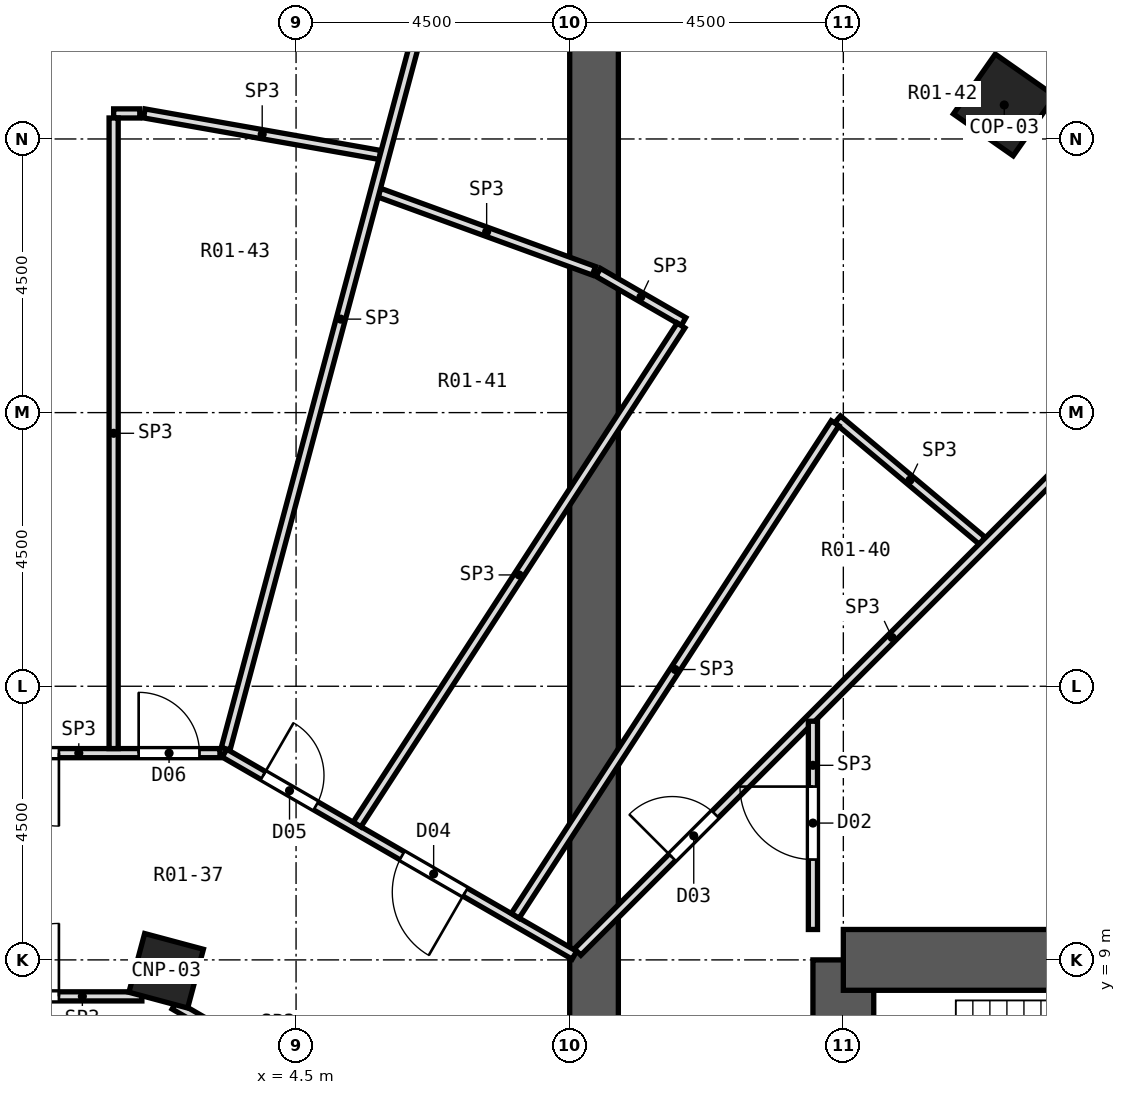
"""IFC4 building model, lengths in metres.
Left out: names, types, materials, properties, quantities, classifications, styles, units other than length and angle.
Written with IfcOpenShell. Run it as: python <this file> out.ifc"""

import sys

from ifc_helpers import new_model, si_unit, direction, frame, frame_2d, origin, origin_2d, place, context, subcontext, project, spatial, rectangle, extrude, element, fill, save


model = new_model("IFC4")
c1 = context("Model", 3, precision=1e-05, world=origin(), true_north=direction((0.0, 1.0)))
c2 = subcontext(c1, "Body", "Model", "MODEL_VIEW")
j1 = project(units=[si_unit("LENGTHUNIT", "METRE"), si_unit("PLANEANGLEUNIT", "RADIAN")], contexts=[c1])
p1 = place(None, origin())
s1 = spatial("IfcSite", under=j1, at=p1, CompositionType="ELEMENT")
p2 = place(p1, origin())
s2 = spatial("IfcBuilding", under=s1, at=p2, CompositionType="ELEMENT")
p3 = place(p2, frame((0.0, 0.0, -9.0)))
s3 = spatial("IfcBuildingStorey", under=s2, at=p3, CompositionType="ELEMENT", Elevation=-9.0)
p4 = place(p3, frame((16.146, 23.059, -0.3), z_axis=(0.0, 0.0, 1.0), x_axis=(0.573576436351, 0.819152044289, 0.0)))
e1 = element("IfcColumn", 1, at=p4, inside=s3, PredefinedType="COLUMN", context=c2, shape_type="SweptSolid", body=[
    extrude(rectangle(XDim=1.2, YDim=1.2, at=origin_2d()), origin(), (0.0, 0.0, 1.0), 4.8),
])
p5 = place(p3, frame((2.364, 8.821, -0.3), z_axis=(0.0, 0.0, 1.0), x_axis=(0.258819045103, 0.965925826289, 0.0)))
e2 = element("IfcColumn", 2, at=p5, inside=s3, PredefinedType="COLUMN", context=c2, shape_type="SweptSolid", body=[
    extrude(rectangle(XDim=1.0, YDim=1.0, at=origin_2d()), origin(), (0.0, 0.0, 1.0), 4.8),
])
p6 = place(p3, frame((13.5, -9.0, -0.3), z_axis=(0.0, 0.0, 1.0), x_axis=(0.0, 1.0, 0.0)))
e3 = element("IfcWall", 3, at=p6, inside=s3, PredefinedType="SHEAR", context=c2, shape_type="SweptSolid", body=[
    extrude(rectangle(XDim=18.0, YDim=1.0, at=frame_2d((9.0, 0.0))), origin(), (0.0, 0.0, 1.0), 4.8),
])
p7 = place(p6, frame((15.4, 0.0, 0.3)))
e4 = element("IfcOpeningElement", 4, at=p7, cuts=e3, PredefinedType="OPENING", context=c2, shape_type="SweptSolid", body=[
    extrude(rectangle(XDim=1.2, YDim=2.1, at=frame_2d((0.6, 1.05))), frame((0.0, 0.512, 0.0), z_axis=(0.0, -1.0, 0.0), x_axis=(1.0, 0.0, 0.0)), (0.0, 0.0, 1.0), 1.024),
])
p8 = place(p6, frame((1.4, 0.0, 0.3)))
e5 = element("IfcOpeningElement", 5, at=p8, cuts=e3, PredefinedType="OPENING", context=c2, shape_type="SweptSolid", body=[
    extrude(rectangle(XDim=1.2, YDim=2.1, at=frame_2d((0.6, 1.05))), frame((0.0, 0.512, 0.0), z_axis=(0.0, -1.0, 0.0), x_axis=(1.0, 0.0, 0.0)), (0.0, 0.0, 1.0), 1.024),
])
p9 = place(p6, frame((7.5, 0.0, 0.3)))
e6 = element("IfcOpeningElement", 6, at=p9, cuts=e3, PredefinedType="OPENING", context=c2, shape_type="SweptSolid", body=[
    extrude(rectangle(XDim=3.0, YDim=2.4, at=frame_2d((1.5, 1.2))), frame((0.0, 0.512, 0.0), z_axis=(0.0, -1.0, 0.0), x_axis=(1.0, 0.0, 0.0)), (0.0, 0.0, 1.0), 1.024),
])
p10 = place(p3, frame((13.5, 9.0, -0.3), z_axis=(0.0, 0.0, 1.0), x_axis=(1.0, 0.0, 0.0)))
e7 = element("IfcWall", 7, at=p10, inside=s3, PredefinedType="SHEAR", context=c2, shape_type="SweptSolid", body=[
    extrude(rectangle(XDim=12.4, YDim=1.0, at=frame_2d((6.2, 0.0))), origin(), (0.0, 0.0, 1.0), 4.8),
])
p11 = place(p3, frame((9.4, -27.077, -0.3), z_axis=(0.0, 0.0, 1.0), x_axis=(0.0, 1.0, 0.0)))
e8 = element("IfcWall", 8, at=p11, inside=s3, PredefinedType="SHEAR", context=c2, shape_type="SweptSolid", body=[
    extrude(rectangle(XDim=54.154, YDim=0.8, at=frame_2d((27.077, 0.0))), origin(), (0.0, 0.0, 1.0), 4.8),
])
p12 = place(p3, frame((13.405, 17.888, 0.0), z_axis=(0.0, 0.0, 1.0), x_axis=(0.766130386508, -0.642685172436, 0.0)))
e9 = element("IfcWall", 9, at=p12, inside=s3, PredefinedType="PARTITIONING", context=c2, shape_type="SweptSolid", body=[
    extrude(rectangle(XDim=3.107, YDim=0.15, at=frame_2d((1.553, 0.0))), origin(), (0.0, 0.0, 1.0), 3.95),
])
p13 = place(p3, frame((2.499, 8.257, 0.0), z_axis=(0.0, 0.0, 1.0), x_axis=(0.865990036525, -0.500061252887, 0.0)))
e10 = element("IfcWall", 10, at=p13, inside=s3, PredefinedType="PARTITIONING", context=c2, shape_type="SweptSolid", body=[
    extrude(rectangle(XDim=3.93, YDim=0.15, at=frame_2d((1.965, 0.0))), origin(), (0.0, 0.0, 1.0), 3.95),
])
p14 = place(p3, frame((3.323, 12.4, 0.0), z_axis=(0.0, 0.0, 1.0), x_axis=(0.865961614908, -0.500110469302, 0.0)))
e11 = element("IfcWall", 11, at=p14, inside=s3, PredefinedType="PARTITIONING", context=c2, shape_type="SweptSolid", body=[
    extrude(rectangle(XDim=6.645, YDim=0.15, at=frame_2d((3.322, 0.0))), origin(), (0.0, 0.0, 1.0), 3.95),
])
p15 = place(p14, frame((3.372, 0.0, 0.0)))
e12 = element("IfcOpeningElement", 12, at=p15, cuts=e11, PredefinedType="OPENING", context=c2, shape_type="SweptSolid", body=[
    extrude(rectangle(XDim=1.2, YDim=2.1, at=frame_2d((0.6, 1.05))), frame((0.0, 0.087, 0.0), z_axis=(0.0, -1.0, 0.0), x_axis=(1.0, 0.0, 0.0)), (0.0, 0.0, 1.0), 0.174),
])
p16 = place(p14, frame((0.735, 0.0, 0.0)))
e13 = element("IfcOpeningElement", 13, at=p16, cuts=e11, PredefinedType="OPENING", context=c2, shape_type="SweptSolid", body=[
    extrude(rectangle(XDim=1.0, YDim=2.1, at=frame_2d((0.5, 1.05))), frame((0.0, 0.087, 0.0), z_axis=(0.0, -1.0, 0.0), x_axis=(1.0, 0.0, 0.0)), (0.0, 0.0, 1.0), 0.174),
])
p17 = place(p3, frame((9.469, 20.306, 0.0), z_axis=(0.0, 0.0, 1.0), x_axis=(0.866092740453, -0.499883351328, 0.0)))
e14 = element("IfcWall", 14, at=p17, inside=s3, PredefinedType="PARTITIONING", context=c2, shape_type="SweptSolid", body=[
    extrude(rectangle(XDim=1.62, YDim=0.15, at=frame_2d((0.81, 0.0))), origin(), (0.0, 0.0, 1.0), 3.95),
])
p18 = place(p3, frame((5.869, 21.616, 0.0), z_axis=(0.0, 0.0, 1.0), x_axis=(0.939696584941, -0.342009251703, 0.0)))
e15 = element("IfcWall", 15, at=p18, inside=s3, PredefinedType="PARTITIONING", context=c2, shape_type="SweptSolid", body=[
    extrude(rectangle(XDim=3.756, YDim=0.15, at=frame_2d((1.878, 0.0))), origin(), (0.0, 0.0, 1.0), 3.95),
])
p19 = place(p3, frame((2.005, 22.92, 0.0), z_axis=(0.0, 0.0, 1.0), x_axis=(0.984834721233, -0.173495163777, 0.0)))
e16 = element("IfcWall", 16, at=p19, inside=s3, PredefinedType="PARTITIONING", context=c2, shape_type="SweptSolid", body=[
    extrude(rectangle(XDim=3.936, YDim=0.15, at=frame_2d((1.968, 0.0))), origin(), (0.0, 0.0, 1.0), 3.95),
])
p20 = place(p3, frame((-1.964, 8.4, 0.0), z_axis=(0.0, 0.0, 1.0), x_axis=(1.0, 0.0, 0.0)))
e17 = element("IfcWall", 17, at=p20, inside=s3, PredefinedType="PARTITIONING", context=c2, shape_type="SweptSolid", body=[
    extrude(rectangle(XDim=3.929, YDim=0.15, at=frame_2d((1.964, 0.0))), origin(), (0.0, 0.0, 1.0), 3.95),
])
p21 = place(p20, frame((1.365, 0.0, 0.0)))
e18 = element("IfcOpeningElement", 18, at=p21, cuts=e17, PredefinedType="OPENING", context=c2, shape_type="SweptSolid", body=[
    extrude(rectangle(XDim=1.2, YDim=2.1, at=frame_2d((0.6, 1.05))), frame((0.0, 0.087, 0.0), z_axis=(0.0, -1.0, 0.0), x_axis=(1.0, 0.0, 0.0)), (0.0, 0.0, 1.0), 0.174),
])
p22 = place(p3, frame((-3.273, 12.4, 0.0), z_axis=(0.0, 0.0, 1.0), x_axis=(1.0, 0.0, 0.0)))
e19 = element("IfcWall", 19, at=p22, inside=s3, PredefinedType="PARTITIONING", context=c2, shape_type="SweptSolid", body=[
    extrude(rectangle(XDim=6.521, YDim=0.15, at=frame_2d((3.26, 0.0))), origin(), (0.0, 0.0, 1.0), 3.95),
])
p23 = place(p22, frame((5.185, 0.0, 0.0)))
e20 = element("IfcOpeningElement", 20, at=p23, cuts=e19, PredefinedType="OPENING", context=c2, shape_type="SweptSolid", body=[
    extrude(rectangle(XDim=1.0, YDim=2.1, at=frame_2d((0.5, 1.05))), frame((0.0, 0.087, 0.0), z_axis=(0.0, -1.0, 0.0), x_axis=(1.0, 0.0, 0.0)), (0.0, 0.0, 1.0), 0.174),
])
p24 = place(p22, frame((2.673, 0.0, 0.0)))
e21 = element("IfcOpeningElement", 21, at=p24, cuts=e19, PredefinedType="OPENING", context=c2, shape_type="SweptSolid", body=[
    extrude(rectangle(XDim=1.2, YDim=2.1, at=frame_2d((0.6, 1.05))), frame((0.0, 0.087, 0.0), z_axis=(0.0, -1.0, 0.0), x_axis=(1.0, 0.0, 0.0)), (0.0, 0.0, 1.0), 0.174),
])
p25 = place(p22, frame((0.412, 0.0, 0.0)))
e22 = element("IfcOpeningElement", 22, at=p25, cuts=e19, PredefinedType="OPENING", context=c2, shape_type="SweptSolid", body=[
    extrude(rectangle(XDim=0.9, YDim=2.1, at=frame_2d((0.45, 1.05))), frame((0.0, 0.087, 0.0), z_axis=(0.0, -1.0, 0.0), x_axis=(1.0, 0.0, 0.0)), (0.0, 0.0, 1.0), 0.174),
])
p26 = place(p3, frame((1.5, 22.92, 0.0), z_axis=(0.0, 0.0, 1.0), x_axis=(1.0, 0.0, 0.0)))
e23 = element("IfcWall", 23, at=p26, inside=s3, PredefinedType="PARTITIONING", context=c2, shape_type="SweptSolid", body=[
    extrude(rectangle(XDim=0.43, YDim=0.15, at=frame_2d((0.215, 0.0))), origin(), (0.0, 0.0, 1.0), 3.95),
])
p27 = place(p3, frame((9.13, 9.13, 0.0), z_axis=(0.0, 0.0, 1.0), x_axis=(0.707106781187, 0.707106781187, 0.0)))
e24 = element("IfcWall", 24, at=p27, inside=s3, PredefinedType="PARTITIONING", context=c2, shape_type="SweptSolid", body=[
    extrude(rectangle(XDim=14.628, YDim=0.15, at=frame_2d((7.314, 0.0))), origin(), (0.0, 0.0, 1.0), 3.95),
])
p28 = place(p27, frame((2.201, 0.0, 0.0)))
e25 = element("IfcOpeningElement", 25, at=p28, cuts=e24, PredefinedType="OPENING", context=c2, shape_type="SweptSolid", body=[
    extrude(rectangle(XDim=1.0, YDim=2.1, at=frame_2d((0.5, 1.05))), frame((0.0, 0.087, 0.0), z_axis=(0.0, -1.0, 0.0), x_axis=(1.0, 0.0, 0.0)), (0.0, 0.0, 1.0), 0.174),
])
p29 = place(p3, frame((8.104, 9.725, 0.0), z_axis=(0.0, 0.0, 1.0), x_axis=(0.54464977912, 0.838663590544, 0.0)))
e26 = element("IfcWall", 26, at=p29, inside=s3, PredefinedType="PARTITIONING", context=c2, shape_type="SweptSolid", body=[
    extrude(rectangle(XDim=9.658, YDim=0.15, at=frame_2d((4.829, 0.0))), origin(), (0.0, 0.0, 1.0), 3.95),
])
p30 = place(p3, frame((5.503, 11.228, 0.0), z_axis=(0.0, 0.0, 1.0), x_axis=(0.544640091629, 0.838669881772, 0.0)))
e27 = element("IfcWall", 27, at=p30, inside=s3, PredefinedType="PARTITIONING", context=c2, shape_type="SweptSolid", body=[
    extrude(rectangle(XDim=9.784, YDim=0.15, at=frame_2d((4.892, 0.0))), origin(), (0.0, 0.0, 1.0), 3.95),
])
p31 = place(p3, frame((3.342, 12.472, 0.0), z_axis=(0.0, 0.0, 1.0), x_axis=(0.258787532185, 0.965934269599, 0.0)))
e28 = element("IfcWall", 28, at=p31, inside=s3, PredefinedType="PARTITIONING", context=c2, shape_type="SweptSolid", body=[
    extrude(rectangle(XDim=14.627, YDim=0.15, at=frame_2d((7.314, 0.0))), origin(), (0.0, 0.0, 1.0), 3.95),
])
p32 = place(p3, frame((13.0, 9.5, 0.0), z_axis=(0.0, 0.0, 1.0), x_axis=(0.0, 1.0, 0.0)))
e29 = element("IfcWall", 29, at=p32, inside=s3, PredefinedType="PARTITIONING", context=c2, shape_type="SweptSolid", body=[
    extrude(rectangle(XDim=3.425, YDim=0.15, at=frame_2d((1.712, 0.0))), origin(), (0.0, 0.0, 1.0), 3.95),
])
p33 = place(p32, frame((1.15, 0.0, 0.0)))
e30 = element("IfcOpeningElement", 30, at=p33, cuts=e29, PredefinedType="OPENING", context=c2, shape_type="SweptSolid", body=[
    extrude(rectangle(XDim=1.2, YDim=2.1, at=frame_2d((0.6, 1.05))), frame((0.0, 0.087, 0.0), z_axis=(0.0, -1.0, 0.0), x_axis=(1.0, 0.0, 0.0)), (0.0, 0.0, 1.0), 0.174),
])
p34 = place(p3, frame((1.5, 12.475, 0.0), z_axis=(0.0, 0.0, 1.0), x_axis=(0.0, 1.0, 0.0)))
e31 = element("IfcWall", 31, at=p34, inside=s3, PredefinedType="PARTITIONING", context=c2, shape_type="SweptSolid", body=[
    extrude(rectangle(XDim=10.37, YDim=0.15, at=frame_2d((5.185, 0.0))), origin(), (0.0, 0.0, 1.0), 3.95),
])
p35 = place(p33, origin())
e32 = element("IfcDoor", 32, at=p35, inside=s3, OperationType="SINGLE_SWING_RIGHT", PredefinedType="DOOR", context=c2, shape_type="SweptSolid", body=[
    extrude(rectangle(XDim=1.2, YDim=2.1, at=frame_2d((0.6, 1.05))), frame((0.0, 0.025, 0.0), z_axis=(0.0, -1.0, 0.0), x_axis=(1.0, 0.0, 0.0)), (0.0, 0.0, 1.0), 0.05),
])
fill(e30, e32)
p36 = place(p28, origin())
e33 = element("IfcDoor", 33, at=p36, inside=s3, OperationType="SINGLE_SWING_LEFT", PredefinedType="DOOR", context=c2, shape_type="SweptSolid", body=[
    extrude(rectangle(XDim=1.0, YDim=2.1, at=frame_2d((0.5, 1.05))), frame((0.0, 0.025, 0.0), z_axis=(0.0, -1.0, 0.0), x_axis=(1.0, 0.0, 0.0)), (0.0, 0.0, 1.0), 0.05),
])
fill(e25, e33)
p37 = place(p15, frame((1.2, 0.0, 0.0), z_axis=(0.0, 0.0, 1.0), x_axis=(-1.0, 0.0, 0.0)))
e34 = element("IfcDoor", 34, at=p37, inside=s3, OperationType="SINGLE_SWING_LEFT", PredefinedType="DOOR", context=c2, shape_type="SweptSolid", body=[
    extrude(rectangle(XDim=1.2, YDim=2.1, at=frame_2d((0.6, 1.05))), frame((0.0, 0.025, 0.0), z_axis=(0.0, -1.0, 0.0), x_axis=(1.0, 0.0, 0.0)), (0.0, 0.0, 1.0), 0.05),
])
fill(e12, e34)
p38 = place(p16, origin())
e35 = element("IfcDoor", 35, at=p38, inside=s3, OperationType="SINGLE_SWING_LEFT", PredefinedType="DOOR", context=c2, shape_type="SweptSolid", body=[
    extrude(rectangle(XDim=1.0, YDim=2.1, at=frame_2d((0.5, 1.05))), frame((0.0, 0.025, 0.0), z_axis=(0.0, -1.0, 0.0), x_axis=(1.0, 0.0, 0.0)), (0.0, 0.0, 1.0), 0.05),
])
fill(e13, e35)
p39 = place(p23, origin())
e36 = element("IfcDoor", 36, at=p39, inside=s3, OperationType="SINGLE_SWING_LEFT", PredefinedType="DOOR", context=c2, shape_type="SweptSolid", body=[
    extrude(rectangle(XDim=1.0, YDim=2.1, at=frame_2d((0.5, 1.05))), frame((0.0, 0.025, 0.0), z_axis=(0.0, -1.0, 0.0), x_axis=(1.0, 0.0, 0.0)), (0.0, 0.0, 1.0), 0.05),
])
fill(e20, e36)
p40 = place(p21, origin())
e37 = element("IfcDoor", 37, at=p40, inside=s3, OperationType="SINGLE_SWING_RIGHT", PredefinedType="DOOR", context=c2, shape_type="SweptSolid", body=[
    extrude(rectangle(XDim=1.2, YDim=2.1, at=frame_2d((0.6, 1.05))), frame((0.0, 0.025, 0.0), z_axis=(0.0, -1.0, 0.0), x_axis=(1.0, 0.0, 0.0)), (0.0, 0.0, 1.0), 0.05),
])
fill(e18, e37)
p41 = place(p24, frame((1.2, 0.0, 0.0), z_axis=(0.0, 0.0, 1.0), x_axis=(-1.0, 0.0, 0.0)))
e38 = element("IfcDoor", 38, at=p41, inside=s3, OperationType="SINGLE_SWING_LEFT", PredefinedType="DOOR", context=c2, shape_type="SweptSolid", body=[
    extrude(rectangle(XDim=1.2, YDim=2.1, at=frame_2d((0.6, 1.05))), frame((0.0, 0.025, 0.0), z_axis=(0.0, -1.0, 0.0), x_axis=(1.0, 0.0, 0.0)), (0.0, 0.0, 1.0), 0.05),
])
fill(e21, e38)
save(model, sys.argv[1])
